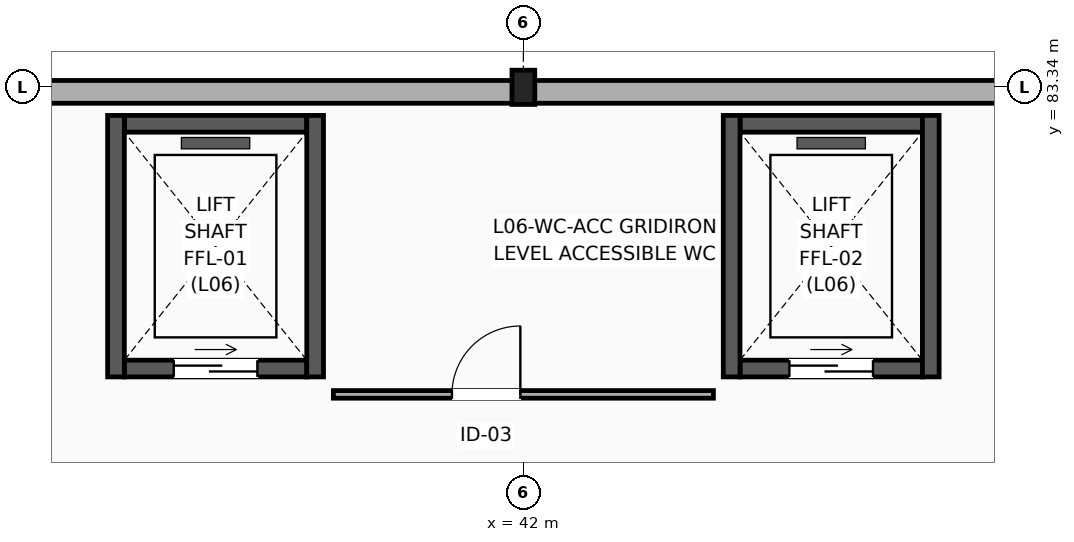
"""IFC4 building model, lengths in metres.
Left out: names, types, materials, properties, quantities, classifications, styles, units other than length and angle.
Written with IfcOpenShell. Run it as: python <this file> out.ifc"""

import sys

from ifc_helpers import new_model, si_unit, direction, frame, frame_2d, origin, origin_2d, place, context, subcontext, project, spatial, rectangle, i_section, extrude, element, fill, save


model = new_model("IFC4")
c1 = context("Model", 3, precision=1e-05, world=origin(), true_north=direction((0.0, 1.0)))
c2 = subcontext(c1, "Body", "Model", "MODEL_VIEW")
j1 = project(units=[si_unit("LENGTHUNIT", "METRE"), si_unit("PLANEANGLEUNIT", "RADIAN")], contexts=[c1])
p1 = place(None, origin())
s1 = spatial("IfcSite", under=j1, at=p1, CompositionType="ELEMENT")
p2 = place(p1, origin())
s2 = spatial("IfcBuilding", under=s1, at=p2, CompositionType="ELEMENT")
p3 = place(p2, frame((0.0, 0.0, 27.6)))
s3 = spatial("IfcBuildingStorey", under=s2, at=p3, CompositionType="ELEMENT", Elevation=27.6)
p4 = place(p3, frame((42.0, 83.34, 0.0), z_axis=(0.0, 0.0, 1.0), x_axis=(1.0, 0.0, 0.0)))
e1 = element("IfcColumn", 1, at=p4, inside=s3, PredefinedType="COLUMN", context=c2, shape_type="SweptSolid", body=[
    extrude(i_section(OverallWidth=0.3, OverallDepth=0.45, WebThickness=0.014, FlangeThickness=0.026, FilletRadius=0.027, at=origin_2d()), origin(), (0.0, 0.0, 1.0), 6.0),
])
p5 = place(p3, frame((26.25, 83.28, 0.0), z_axis=(0.0, 0.0, 1.0), x_axis=(1.0, 0.0, 0.0)))
e2 = element("IfcWall", 2, at=p5, inside=s3, PredefinedType="SOLIDWALL", context=c2, shape_type="SweptSolid", body=[
    extrude(rectangle(XDim=31.5, YDim=0.3, at=frame_2d((15.75, 0.0))), origin(), (0.0, 0.0, 1.0), 5.145),
])
p6 = place(p5, frame((1.8, 0.0, 1.5)))
e3 = element("IfcOpeningElement", 3, at=p6, cuts=e2, PredefinedType="OPENING", context=c2, shape_type="SweptSolid", body=[
    extrude(rectangle(XDim=2.85, YDim=1.65, at=frame_2d((1.425, 0.825))), frame((0.0, 0.16, 0.0), z_axis=(0.0, -1.0, 0.0), x_axis=(1.0, 0.0, 0.0)), (0.0, 0.0, 1.0), 0.32),
])
p7 = place(p5, frame((25.6, 0.0, 1.5)))
e4 = element("IfcOpeningElement", 4, at=p7, cuts=e2, PredefinedType="OPENING", context=c2, shape_type="SweptSolid", body=[
    extrude(rectangle(XDim=2.85, YDim=1.65, at=frame_2d((1.425, 0.825))), frame((0.0, 0.16, 0.0), z_axis=(0.0, -1.0, 0.0), x_axis=(1.0, 0.0, 0.0)), (0.0, 0.0, 1.0), 0.32),
])
p8 = place(p3, frame((36.75, 79.64, 0.0), z_axis=(0.0, 0.0, 1.0), x_axis=(1.0, 0.0, 0.0)))
e5 = element("IfcWall", 5, at=p8, inside=s3, PredefinedType="SOLIDWALL", context=c2, shape_type="SweptSolid", body=[
    extrude(rectangle(XDim=2.4, YDim=0.22, at=frame_2d((1.2, 0.0))), origin(), (0.0, 0.0, 1.0), 5.765),
])
p9 = place(p8, frame((0.65, 0.0, 0.0)))
e6 = element("IfcOpeningElement", 6, at=p9, cuts=e5, PredefinedType="OPENING", context=c2, shape_type="SweptSolid", body=[
    extrude(rectangle(XDim=1.1, YDim=2.2, at=frame_2d((0.55, 1.1))), frame((0.0, 0.12, 0.0), z_axis=(0.0, -1.0, 0.0), x_axis=(1.0, 0.0, 0.0)), (0.0, 0.0, 1.0), 0.24),
])
p10 = place(p3, frame((36.75, 82.86, 0.0), z_axis=(0.0, 0.0, 1.0), x_axis=(1.0, 0.0, 0.0)))
e7 = element("IfcWall", 7, at=p10, inside=s3, PredefinedType="SOLIDWALL", context=c2, shape_type="SweptSolid", body=[
    extrude(rectangle(XDim=2.4, YDim=0.22, at=frame_2d((1.2, 0.0))), origin(), (0.0, 0.0, 1.0), 5.765),
])
for number, where, z_axis, x_axis in (
    (8, (36.64, 79.53, 0.0), (0.0, 0.0, 1.0), (0.0, 1.0, 0.0)),
    (9, (39.26, 79.53, 0.0), (0.0, 0.0, 1.0), (0.0, 1.0, 0.0)),
):
    element("IfcWall", number, at=place(p3, frame(where, z_axis=z_axis, x_axis=x_axis)), inside=s3, PredefinedType="SOLIDWALL", context=c2, shape_type="SweptSolid", body=[
        extrude(rectangle(XDim=3.44, YDim=0.22, at=frame_2d((1.72, 0.0))), origin(), (0.0, 0.0, 1.0), 5.765),
    ])
p11 = place(p3, frame((44.85, 79.64, 0.0), z_axis=(0.0, 0.0, 1.0), x_axis=(1.0, 0.0, 0.0)))
e10 = element("IfcWall", 10, at=p11, inside=s3, PredefinedType="SOLIDWALL", context=c2, shape_type="SweptSolid", body=[
    extrude(rectangle(XDim=2.4, YDim=0.22, at=frame_2d((1.2, 0.0))), origin(), (0.0, 0.0, 1.0), 5.765),
])
p12 = place(p11, frame((0.65, 0.0, 0.0)))
e11 = element("IfcOpeningElement", 11, at=p12, cuts=e10, PredefinedType="OPENING", context=c2, shape_type="SweptSolid", body=[
    extrude(rectangle(XDim=1.1, YDim=2.2, at=frame_2d((0.55, 1.1))), frame((0.0, 0.12, 0.0), z_axis=(0.0, -1.0, 0.0), x_axis=(1.0, 0.0, 0.0)), (0.0, 0.0, 1.0), 0.24),
])
p13 = place(p3, frame((44.85, 82.86, 0.0), z_axis=(0.0, 0.0, 1.0), x_axis=(1.0, 0.0, 0.0)))
e12 = element("IfcWall", 12, at=p13, inside=s3, PredefinedType="SOLIDWALL", context=c2, shape_type="SweptSolid", body=[
    extrude(rectangle(XDim=2.4, YDim=0.22, at=frame_2d((1.2, 0.0))), origin(), (0.0, 0.0, 1.0), 5.765),
])
for number, where, z_axis, x_axis in (
    (13, (44.74, 79.53, 0.0), (0.0, 0.0, 1.0), (0.0, 1.0, 0.0)),
    (14, (47.36, 79.53, 0.0), (0.0, 0.0, 1.0), (0.0, 1.0, 0.0)),
):
    element("IfcWall", number, at=place(p3, frame(where, z_axis=z_axis, x_axis=x_axis)), inside=s3, PredefinedType="SOLIDWALL", context=c2, shape_type="SweptSolid", body=[
        extrude(rectangle(XDim=3.44, YDim=0.22, at=frame_2d((1.72, 0.0))), origin(), (0.0, 0.0, 1.0), 5.765),
    ])
p14 = place(p3, frame((39.5, 79.3, 0.0), z_axis=(0.0, 0.0, 1.0), x_axis=(1.0, 0.0, 0.0)))
e15 = element("IfcWall", 15, at=p14, inside=s3, PredefinedType="PARTITIONING", context=c2, shape_type="SweptSolid", body=[
    extrude(rectangle(XDim=5.0, YDim=0.1, at=frame_2d((2.5, 0.0))), origin(), (0.0, 0.0, 1.0), 5.745),
])
p15 = place(p14, frame((1.56, 0.0, 0.0)))
e16 = element("IfcOpeningElement", 16, at=p15, cuts=e15, PredefinedType="OPENING", context=c2, shape_type="SweptSolid", body=[
    extrude(rectangle(XDim=0.9, YDim=2.1, at=frame_2d((0.45, 1.05))), frame((0.0, 0.06, 0.0), z_axis=(0.0, -1.0, 0.0), x_axis=(1.0, 0.0, 0.0)), (0.0, 0.0, 1.0), 0.12),
])
p16 = place(p9, origin())
e17 = element("IfcDoor", 17, at=p16, inside=s3, OperationType="SLIDING_TO_LEFT", PredefinedType="DOOR", context=c2, shape_type="SweptSolid", body=[
    extrude(rectangle(XDim=1.1, YDim=2.2, at=frame_2d((0.55, 1.1))), frame((0.0, 0.025, 0.0), z_axis=(0.0, -1.0, 0.0), x_axis=(1.0, 0.0, 0.0)), (0.0, 0.0, 1.0), 0.05),
])
fill(e6, e17)
p17 = place(p12, origin())
e18 = element("IfcDoor", 18, at=p17, inside=s3, OperationType="SLIDING_TO_LEFT", PredefinedType="DOOR", context=c2, shape_type="SweptSolid", body=[
    extrude(rectangle(XDim=1.1, YDim=2.2, at=frame_2d((0.55, 1.1))), frame((0.0, 0.025, 0.0), z_axis=(0.0, -1.0, 0.0), x_axis=(1.0, 0.0, 0.0)), (0.0, 0.0, 1.0), 0.05),
])
fill(e11, e18)
p18 = place(p15, origin())
e19 = element("IfcDoor", 19, at=p18, inside=s3, OperationType="SINGLE_SWING_RIGHT", PredefinedType="DOOR", context=c2, shape_type="SweptSolid", body=[
    extrude(rectangle(XDim=0.9, YDim=2.1, at=frame_2d((0.45, 1.05))), frame((0.0, 0.025, 0.0), z_axis=(0.0, -1.0, 0.0), x_axis=(1.0, 0.0, 0.0)), (0.0, 0.0, 1.0), 0.05),
])
fill(e16, e19)
save(model, sys.argv[1])
